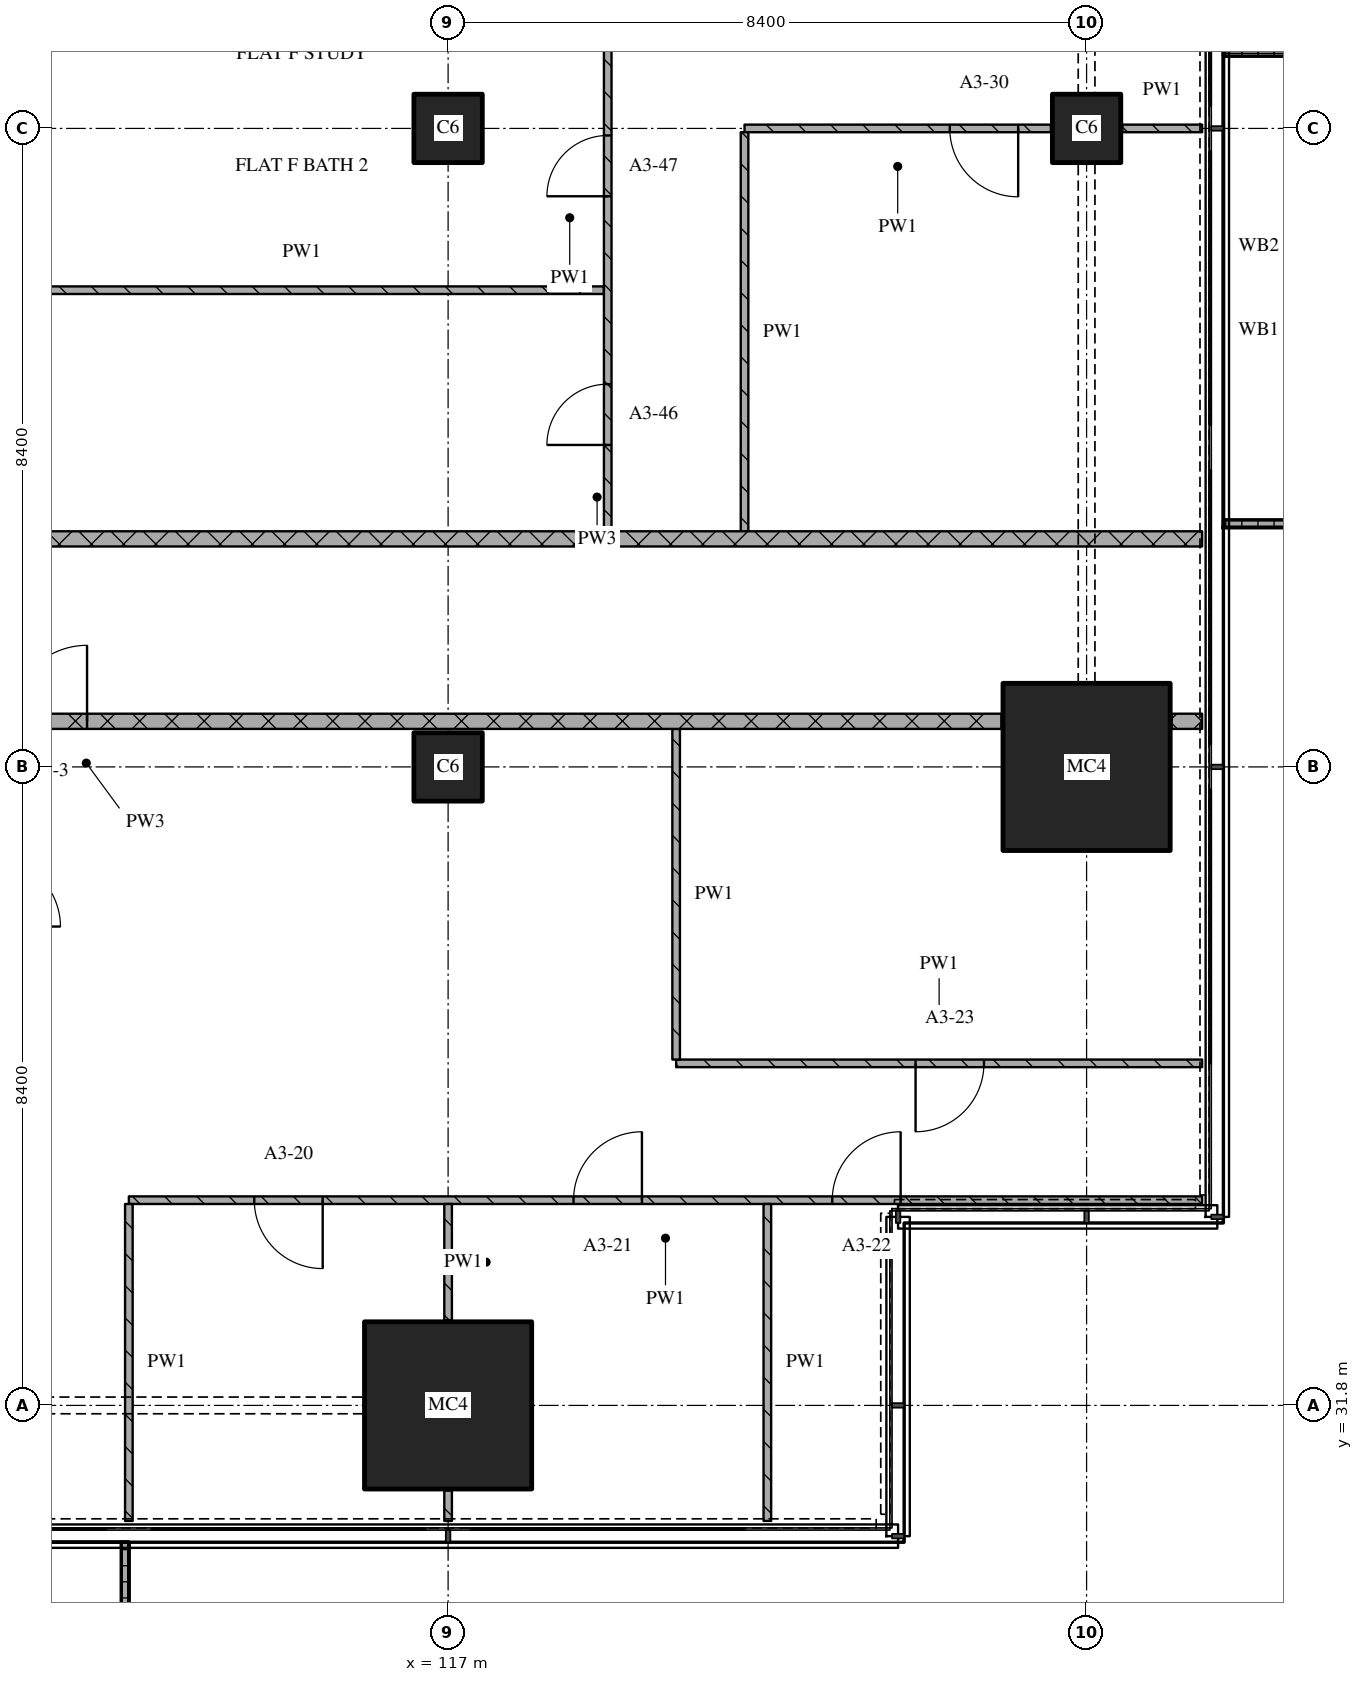
"""IFC4 building model, lengths in metres.
Left out: names, types, materials, properties, quantities, classifications, styles, units other than length and angle.
Written with IfcOpenShell. Run it as: python <this file> out.ifc"""

import sys

from ifc_helpers import new_model, si_unit, direction, frame, frame_2d, origin, origin_2d, place, context, subcontext, project, spatial, polyline, rectangle, outline, extrude, element, fill, save


model = new_model("IFC4")
c1 = context("Model", 3, precision=1e-05, world=origin(), true_north=direction((0.0, 1.0)))
c2 = subcontext(c1, "Body", "Model", "MODEL_VIEW")
j1 = project(units=[si_unit("LENGTHUNIT", "METRE"), si_unit("PLANEANGLEUNIT", "RADIAN")], contexts=[c1])
p1 = place(None, origin())
s1 = spatial("IfcSite", under=j1, at=p1, CompositionType="ELEMENT")
p2 = place(p1, origin())
s2 = spatial("IfcBuilding", under=s1, at=p2, CompositionType="ELEMENT")
p3 = place(p2, frame((0.0, 0.0, 58.8)))
s3 = spatial("IfcBuildingStorey", under=s2, at=p3, CompositionType="ELEMENT", Elevation=58.8)
p4 = place(p3, frame((117.0, 31.8, 0.0), z_axis=(0.0, 0.0, 1.0), x_axis=(1.0, 0.0, 0.0)))
e1 = element("IfcColumn", 1, at=p4, inside=s3, PredefinedType="COLUMN", context=c2, shape_type="SweptSolid", body=[
    extrude(rectangle(XDim=2.2, YDim=2.2, at=origin_2d()), origin(), (0.0, 0.0, 1.0), 3.6),
])
for number, where, z_axis, x_axis in (
    (2, (117.0, 40.2, 0.0), (0.0, 0.0, 1.0), (1.0, 0.0, 0.0)),
    (3, (117.0, 48.6, 0.0), (0.0, 0.0, 1.0), (1.0, 0.0, 0.0)),
):
    element("IfcColumn", number, at=place(p3, frame(where, z_axis=z_axis, x_axis=x_axis)), inside=s3, PredefinedType="COLUMN", context=c2, shape_type="SweptSolid", body=[
        extrude(rectangle(XDim=0.9, YDim=0.9, at=origin_2d()), origin(), (0.0, 0.0, 1.0), 3.6),
    ])
p5 = place(p3, frame((125.4, 40.2, 0.0), z_axis=(0.0, 0.0, 1.0), x_axis=(1.0, 0.0, 0.0)))
e4 = element("IfcColumn", 4, at=p5, inside=s3, PredefinedType="COLUMN", context=c2, shape_type="SweptSolid", body=[
    extrude(rectangle(XDim=2.2, YDim=2.2, at=origin_2d()), origin(), (0.0, 0.0, 1.0), 3.6),
])
p6 = place(p3, frame((125.4, 48.6, 0.0), z_axis=(0.0, 0.0, 1.0), x_axis=(1.0, 0.0, 0.0)))
e5 = element("IfcColumn", 5, at=p6, inside=s3, PredefinedType="COLUMN", context=c2, shape_type="SweptSolid", body=[
    extrude(rectangle(XDim=0.9, YDim=0.9, at=origin_2d()), origin(), (0.0, 0.0, 1.0), 3.6),
])
p7 = place(p3, origin())
e6 = element("IfcWall", 6, at=p7, inside=s3, PredefinedType="SOLIDWALL", context=c2, shape_type="SweptSolid", body=[
    extrude(outline(polyline([(108.6, 30.0), (108.7, 30.0), (108.7, 28.367), (112.7, 28.367), (112.7, 30.0), (112.8, 30.0), (112.8, 28.267), (108.6, 28.267), (108.6, 30.0)])), origin(), (0.0, 0.0, 1.0), 1.0),
])
p8 = place(p3, origin())
e7 = element("IfcWall", 7, at=p8, inside=s3, PredefinedType="SOLIDWALL", context=c2, shape_type="SweptSolid", body=[
    extrude(outline(polyline([(127.2, 43.35), (127.2, 43.45), (128.967, 43.45), (128.967, 49.55), (127.2, 49.55), (127.2, 49.65), (129.067, 49.65), (129.067, 43.35), (127.2, 43.35)])), origin(), (0.0, 0.0, 1.0), 1.0),
])
p9 = place(p3, frame((126.92, 34.5, 0.0), z_axis=(0.0, 0.0, 1.0), x_axis=(-1.0, 0.0, 0.0)))
e8 = element("IfcWall", 8, at=p9, inside=s3, PredefinedType="PARTITIONING", context=c2, shape_type="SweptSolid", body=[
    extrude(rectangle(XDim=14.12, YDim=0.1, at=frame_2d((7.06, 0.0))), origin(), (0.0, 0.0, 1.0), 3.32),
])
p10 = place(p9, frame((3.966, 0.0, 0.0)))
e9 = element("IfcOpeningElement", 9, at=p10, cuts=e8, PredefinedType="OPENING", context=c2, shape_type="SweptSolid", body=[
    extrude(rectangle(XDim=0.9, YDim=2.1, at=frame_2d((0.45, 1.05))), frame((0.0, 0.06, 0.0), z_axis=(0.0, -1.0, 0.0), x_axis=(1.0, 0.0, 0.0)), (0.0, 0.0, 1.0), 0.12),
])
p11 = place(p9, frame((7.37, 0.0, 0.0)))
e10 = element("IfcOpeningElement", 10, at=p11, cuts=e8, PredefinedType="OPENING", context=c2, shape_type="SweptSolid", body=[
    extrude(rectangle(XDim=0.9, YDim=2.1, at=frame_2d((0.45, 1.05))), frame((0.0, 0.06, 0.0), z_axis=(0.0, -1.0, 0.0), x_axis=(1.0, 0.0, 0.0)), (0.0, 0.0, 1.0), 0.12),
])
p12 = place(p9, frame((11.57, 0.0, 0.0)))
e11 = element("IfcOpeningElement", 11, at=p12, cuts=e8, PredefinedType="OPENING", context=c2, shape_type="SweptSolid", body=[
    extrude(rectangle(XDim=0.9, YDim=2.1, at=frame_2d((0.45, 1.05))), frame((0.0, 0.06, 0.0), z_axis=(0.0, -1.0, 0.0), x_axis=(1.0, 0.0, 0.0)), (0.0, 0.0, 1.0), 0.12),
])
p13 = place(p3, frame((120.0, 36.3, 0.0), z_axis=(0.0, 0.0, 1.0), x_axis=(1.0, 0.0, 0.0)))
e12 = element("IfcWall", 12, at=p13, inside=s3, PredefinedType="PARTITIONING", context=c2, shape_type="SweptSolid", body=[
    extrude(rectangle(XDim=6.92, YDim=0.1, at=frame_2d((3.46, 0.0))), origin(), (0.0, 0.0, 1.0), 3.32),
])
p14 = place(p13, frame((3.15, 0.0, 0.0)))
e13 = element("IfcOpeningElement", 13, at=p14, cuts=e12, PredefinedType="OPENING", context=c2, shape_type="SweptSolid", body=[
    extrude(rectangle(XDim=0.9, YDim=2.1, at=frame_2d((0.45, 1.05))), frame((0.0, 0.06, 0.0), z_axis=(0.0, -1.0, 0.0), x_axis=(1.0, 0.0, 0.0)), (0.0, 0.0, 1.0), 0.12),
])
p15 = place(p3, frame((124.28, 40.8, 0.0), z_axis=(0.0, 0.0, 1.0), x_axis=(-1.0, 0.0, 0.0)))
e14 = element("IfcWall", 14, at=p15, inside=s3, PredefinedType="PARTITIONING", context=c2, shape_type="SweptSolid", body=[
    extrude(rectangle(XDim=24.08, YDim=0.2, at=frame_2d((12.04, 0.0))), origin(), (0.0, 0.0, 1.0), 3.32),
])
p16 = place(p15, frame((12.03, 0.0, 0.0)))
e15 = element("IfcOpeningElement", 15, at=p16, cuts=e14, PredefinedType="OPENING", context=c2, shape_type="SweptSolid", body=[
    extrude(rectangle(XDim=1.0, YDim=2.1, at=frame_2d((0.5, 1.05))), frame((0.0, 0.11, 0.0), z_axis=(0.0, -1.0, 0.0), x_axis=(1.0, 0.0, 0.0)), (0.0, 0.0, 1.0), 0.22),
])
p17 = place(p3, frame((126.52, 40.8, 0.0), z_axis=(0.0, 0.0, 1.0), x_axis=(1.0, 0.0, 0.0)))
e16 = element("IfcWall", 16, at=p17, inside=s3, PredefinedType="PARTITIONING", context=c2, shape_type="SweptSolid", body=[
    extrude(rectangle(XDim=0.4, YDim=0.2, at=frame_2d((0.2, 0.0))), origin(), (0.0, 0.0, 1.0), 3.32),
])
p18 = place(p3, frame((111.0, 43.2, 0.0), z_axis=(0.0, 0.0, 1.0), x_axis=(1.0, 0.0, 0.0)))
e17 = element("IfcWall", 17, at=p18, inside=s3, PredefinedType="PARTITIONING", context=c2, shape_type="SweptSolid", body=[
    extrude(rectangle(XDim=15.92, YDim=0.2, at=frame_2d((7.96, 0.0))), origin(), (0.0, 0.0, 1.0), 3.32),
])
p19 = place(p3, frame((111.1, 46.472, 0.0), z_axis=(0.0, 0.0, 1.0), x_axis=(1.0, 0.0, 0.0)))
e18 = element("IfcWall", 18, at=p19, inside=s3, PredefinedType="PARTITIONING", context=c2, shape_type="SweptSolid", body=[
    extrude(rectangle(XDim=7.95, YDim=0.1, at=frame_2d((3.975, 0.0))), origin(), (0.0, 0.0, 1.0), 3.32),
])
p20 = place(p3, frame((124.93, 48.6, 0.0), z_axis=(0.0, 0.0, 1.0), x_axis=(-1.0, 0.0, 0.0)))
e19 = element("IfcWall", 19, at=p20, inside=s3, PredefinedType="PARTITIONING", context=c2, shape_type="SweptSolid", body=[
    extrude(rectangle(XDim=4.03, YDim=0.1, at=frame_2d((2.015, 0.0))), origin(), (0.0, 0.0, 1.0), 3.32),
])
p21 = place(p20, frame((0.43, 0.0, 0.0)))
e20 = element("IfcOpeningElement", 20, at=p21, cuts=e19, PredefinedType="OPENING", context=c2, shape_type="SweptSolid", body=[
    extrude(rectangle(XDim=0.9, YDim=2.1, at=frame_2d((0.45, 1.05))), frame((0.0, 0.06, 0.0), z_axis=(0.0, -1.0, 0.0), x_axis=(1.0, 0.0, 0.0)), (0.0, 0.0, 1.0), 0.12),
])
p22 = place(p3, frame((125.87, 48.6, 0.0), z_axis=(0.0, 0.0, 1.0), x_axis=(1.0, 0.0, 0.0)))
e21 = element("IfcWall", 21, at=p22, inside=s3, PredefinedType="PARTITIONING", context=c2, shape_type="SweptSolid", body=[
    extrude(rectangle(XDim=1.05, YDim=0.1, at=frame_2d((0.525, 0.0))), origin(), (0.0, 0.0, 1.0), 3.32),
])
p23 = place(p3, frame((112.8, 34.45, 0.0), z_axis=(0.0, 0.0, 1.0), x_axis=(0.0, -1.0, 0.0)))
e22 = element("IfcWall", 22, at=p23, inside=s3, PredefinedType="PARTITIONING", context=c2, shape_type="SweptSolid", body=[
    extrude(rectangle(XDim=4.17, YDim=0.1, at=frame_2d((2.085, 0.0))), origin(), (0.0, 0.0, 1.0), 3.32),
])
p24 = place(p3, frame((117.0, 30.68, 0.0), z_axis=(0.0, 0.0, 1.0), x_axis=(0.0, -1.0, 0.0)))
e23 = element("IfcWall", 23, at=p24, inside=s3, PredefinedType="PARTITIONING", context=c2, shape_type="SweptSolid", body=[
    extrude(rectangle(XDim=0.4, YDim=0.1, at=frame_2d((0.2, 0.0))), origin(), (0.0, 0.0, 1.0), 3.32),
])
p25 = place(p3, frame((117.0, 34.45, 0.0), z_axis=(0.0, 0.0, 1.0), x_axis=(0.0, -1.0, 0.0)))
e24 = element("IfcWall", 24, at=p25, inside=s3, PredefinedType="PARTITIONING", context=c2, shape_type="SweptSolid", body=[
    extrude(rectangle(XDim=1.53, YDim=0.1, at=frame_2d((0.765, 0.0))), origin(), (0.0, 0.0, 1.0), 3.32),
])
p26 = place(p3, frame((119.1, 43.3, 0.0), z_axis=(0.0, 0.0, 1.0), x_axis=(0.0, 1.0, 0.0)))
e25 = element("IfcWall", 25, at=p26, inside=s3, PredefinedType="PARTITIONING", context=c2, shape_type="SweptSolid", body=[
    extrude(rectangle(XDim=8.25, YDim=0.1, at=frame_2d((4.125, 0.0))), origin(), (0.0, 0.0, 1.0), 3.32),
])
p27 = place(p26, frame((1.136, 0.0, 0.0)))
e26 = element("IfcOpeningElement", 26, at=p27, cuts=e25, PredefinedType="OPENING", context=c2, shape_type="SweptSolid", body=[
    extrude(rectangle(XDim=0.8, YDim=2.1, at=frame_2d((0.4, 1.05))), frame((0.0, 0.06, 0.0), z_axis=(0.0, -1.0, 0.0), x_axis=(1.0, 0.0, 0.0)), (0.0, 0.0, 1.0), 0.12),
])
p28 = place(p26, frame((4.407, 0.0, 0.0)))
e27 = element("IfcOpeningElement", 27, at=p28, cuts=e25, PredefinedType="OPENING", context=c2, shape_type="SweptSolid", body=[
    extrude(rectangle(XDim=0.8, YDim=2.1, at=frame_2d((0.4, 1.05))), frame((0.0, 0.06, 0.0), z_axis=(0.0, -1.0, 0.0), x_axis=(1.0, 0.0, 0.0)), (0.0, 0.0, 1.0), 0.12),
])
p29 = place(p3, frame((120.0, 40.7, 0.0), z_axis=(0.0, 0.0, 1.0), x_axis=(0.0, -1.0, 0.0)))
e28 = element("IfcWall", 28, at=p29, inside=s3, PredefinedType="PARTITIONING", context=c2, shape_type="SweptSolid", body=[
    extrude(rectangle(XDim=4.35, YDim=0.1, at=frame_2d((2.175, 0.0))), origin(), (0.0, 0.0, 1.0), 3.32),
])
p30 = place(p3, frame((120.9, 48.55, 0.0), z_axis=(0.0, 0.0, 1.0), x_axis=(0.0, -1.0, 0.0)))
e29 = element("IfcWall", 29, at=p30, inside=s3, PredefinedType="PARTITIONING", context=c2, shape_type="SweptSolid", body=[
    extrude(rectangle(XDim=5.25, YDim=0.1, at=frame_2d((2.625, 0.0))), origin(), (0.0, 0.0, 1.0), 3.32),
])
p31 = place(p3, frame((121.2, 34.45, 0.0), z_axis=(0.0, 0.0, 1.0), x_axis=(0.0, -1.0, 0.0)))
e30 = element("IfcWall", 30, at=p31, inside=s3, PredefinedType="PARTITIONING", context=c2, shape_type="SweptSolid", body=[
    extrude(rectangle(XDim=4.17, YDim=0.1, at=frame_2d((2.085, 0.0))), origin(), (0.0, 0.0, 1.0), 3.32),
])
p32 = place(p10, origin())
e31 = element("IfcDoor", 31, at=p32, inside=s3, OperationType="SINGLE_SWING_RIGHT", PredefinedType="DOOR", context=c2, shape_type="SweptSolid", body=[
    extrude(rectangle(XDim=0.9, YDim=2.1, at=frame_2d((0.45, 1.05))), frame((0.0, 0.025, 0.0), z_axis=(0.0, -1.0, 0.0), x_axis=(1.0, 0.0, 0.0)), (0.0, 0.0, 1.0), 0.05),
])
fill(e9, e31)
p33 = place(p11, origin())
e32 = element("IfcDoor", 32, at=p33, inside=s3, OperationType="SINGLE_SWING_RIGHT", PredefinedType="DOOR", context=c2, shape_type="SweptSolid", body=[
    extrude(rectangle(XDim=0.9, YDim=2.1, at=frame_2d((0.45, 1.05))), frame((0.0, 0.025, 0.0), z_axis=(0.0, -1.0, 0.0), x_axis=(1.0, 0.0, 0.0)), (0.0, 0.0, 1.0), 0.05),
])
fill(e10, e32)
p34 = place(p12, origin())
e33 = element("IfcDoor", 33, at=p34, inside=s3, OperationType="SINGLE_SWING_LEFT", PredefinedType="DOOR", context=c2, shape_type="SweptSolid", body=[
    extrude(rectangle(XDim=0.9, YDim=2.1, at=frame_2d((0.45, 1.05))), frame((0.0, 0.025, 0.0), z_axis=(0.0, -1.0, 0.0), x_axis=(1.0, 0.0, 0.0)), (0.0, 0.0, 1.0), 0.05),
])
fill(e11, e33)
p35 = place(p14, origin())
e34 = element("IfcDoor", 34, at=p35, inside=s3, OperationType="SINGLE_SWING_RIGHT", PredefinedType="DOOR", context=c2, shape_type="SweptSolid", body=[
    extrude(rectangle(XDim=0.9, YDim=2.1, at=frame_2d((0.45, 1.05))), frame((0.0, 0.025, 0.0), z_axis=(0.0, -1.0, 0.0), x_axis=(1.0, 0.0, 0.0)), (0.0, 0.0, 1.0), 0.05),
])
fill(e13, e34)
p36 = place(p16, origin())
e35 = element("IfcDoor", 35, at=p36, inside=s3, OperationType="SINGLE_SWING_RIGHT", PredefinedType="DOOR", context=c2, shape_type="SweptSolid", body=[
    extrude(rectangle(XDim=1.0, YDim=2.1, at=frame_2d((0.5, 1.05))), frame((0.0, 0.025, 0.0), z_axis=(0.0, -1.0, 0.0), x_axis=(1.0, 0.0, 0.0)), (0.0, 0.0, 1.0), 0.05),
])
fill(e15, e35)
p37 = place(p21, origin())
e36 = element("IfcDoor", 36, at=p37, inside=s3, OperationType="SINGLE_SWING_LEFT", PredefinedType="DOOR", context=c2, shape_type="SweptSolid", body=[
    extrude(rectangle(XDim=0.9, YDim=2.1, at=frame_2d((0.45, 1.05))), frame((0.0, 0.025, 0.0), z_axis=(0.0, -1.0, 0.0), x_axis=(1.0, 0.0, 0.0)), (0.0, 0.0, 1.0), 0.05),
])
fill(e20, e36)
p38 = place(p27, origin())
e37 = element("IfcDoor", 37, at=p38, inside=s3, OperationType="SINGLE_SWING_LEFT", PredefinedType="DOOR", context=c2, shape_type="SweptSolid", body=[
    extrude(rectangle(XDim=0.8, YDim=2.1, at=frame_2d((0.4, 1.05))), frame((0.0, 0.025, 0.0), z_axis=(0.0, -1.0, 0.0), x_axis=(1.0, 0.0, 0.0)), (0.0, 0.0, 1.0), 0.05),
])
fill(e26, e37)
p39 = place(p28, origin())
e38 = element("IfcDoor", 38, at=p39, inside=s3, OperationType="SINGLE_SWING_LEFT", PredefinedType="DOOR", context=c2, shape_type="SweptSolid", body=[
    extrude(rectangle(XDim=0.8, YDim=2.1, at=frame_2d((0.4, 1.05))), frame((0.0, 0.025, 0.0), z_axis=(0.0, -1.0, 0.0), x_axis=(1.0, 0.0, 0.0)), (0.0, 0.0, 1.0), 0.05),
])
fill(e27, e38)
save(model, sys.argv[1])
